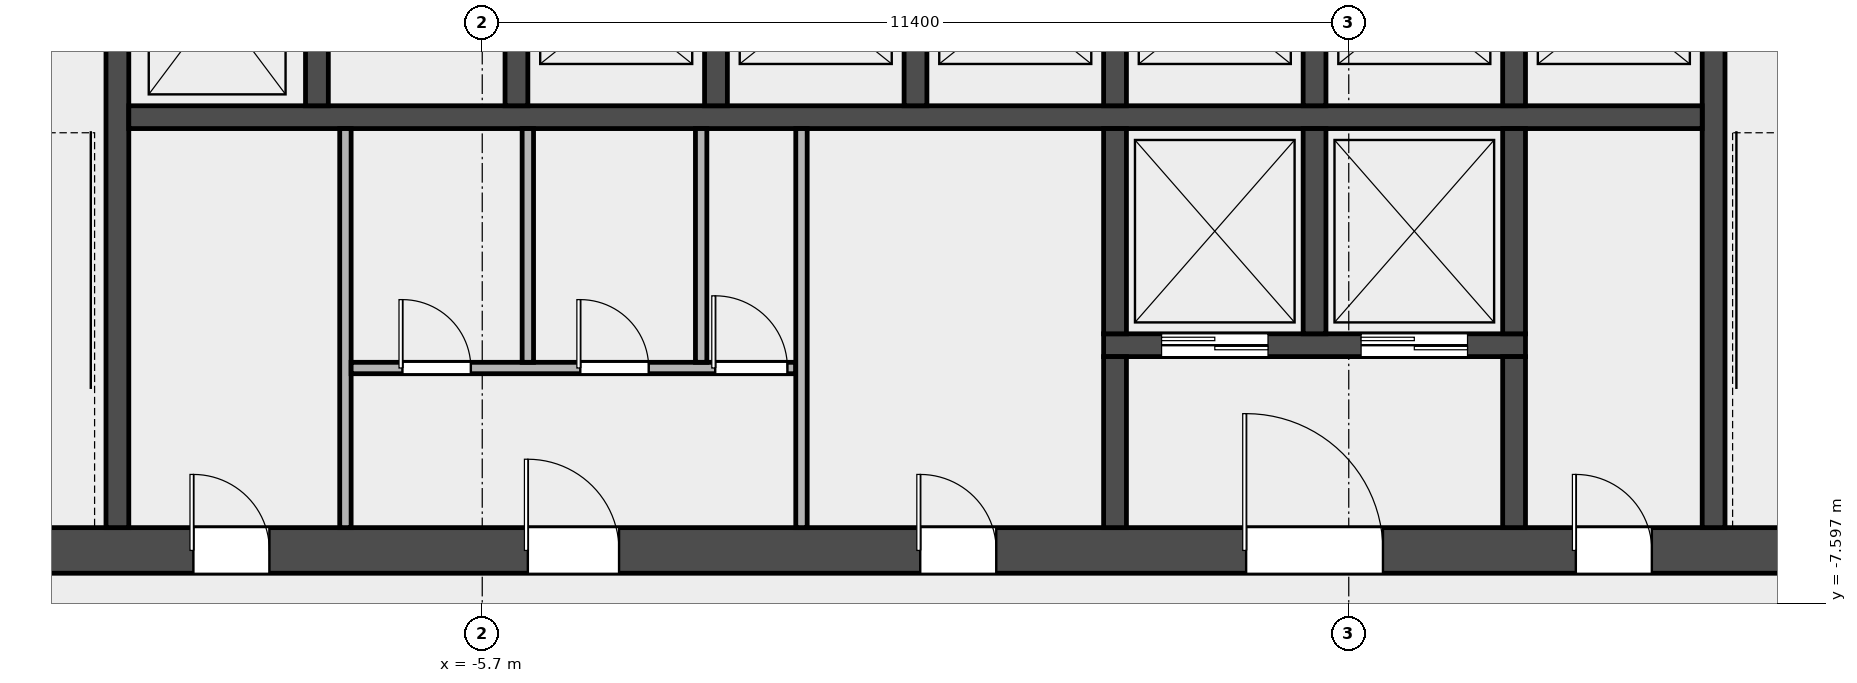
"""IFC4 building model, lengths in metres.
Left out: names, types, materials, properties, quantities, classifications, styles, units other than length and angle.
Written with IfcOpenShell. Run it as: python <this file> out.ifc"""

import sys

from ifc_helpers import new_model, si_unit, direction, frame, frame_2d, origin, place, context, subcontext, project, spatial, rectangle, extrude, element, fill, save


model = new_model("IFC4")
c1 = context("Model", 3, precision=1e-05, world=origin(), true_north=direction((0.0, 1.0)))
c2 = subcontext(c1, "Body", "Model", "MODEL_VIEW")
j1 = project(units=[si_unit("LENGTHUNIT", "METRE"), si_unit("PLANEANGLEUNIT", "RADIAN")], contexts=[c1])
p1 = place(None, origin())
s1 = spatial("IfcSite", under=j1, at=p1, CompositionType="ELEMENT")
p2 = place(p1, origin())
s2 = spatial("IfcBuilding", under=s1, at=p2, CompositionType="ELEMENT")
p3 = place(p2, frame((0.0, 0.0, 139.6)))
s3 = spatial("IfcBuildingStorey", under=s2, at=p3, CompositionType="ELEMENT", Elevation=139.6)
p4 = place(p3, frame((-14.4, -6.9, 0.0), z_axis=(0.0, 0.0, 1.0), x_axis=(1.0, 0.0, 0.0)))
e1 = element("IfcWall", 1, at=p4, inside=s3, PredefinedType="SHEAR", context=c2, shape_type="SweptSolid", body=[
    extrude(rectangle(XDim=28.8, YDim=0.6, at=frame_2d((14.4, 0.0))), origin(), (0.0, 0.0, 1.0), 4.2),
])
p5 = place(p4, frame((4.9, 0.0, 0.0)))
e2 = element("IfcOpeningElement", 2, at=p5, cuts=e1, PredefinedType="OPENING", context=c2, shape_type="SweptSolid", body=[
    extrude(rectangle(XDim=1.0, YDim=2.1, at=frame_2d((0.5, 1.05))), frame((0.0, 0.312, 0.0), z_axis=(0.0, -1.0, 0.0), x_axis=(1.0, 0.0, 0.0)), (0.0, 0.0, 1.0), 0.624),
])
p6 = place(p4, frame((9.3, 0.0, 0.0)))
e3 = element("IfcOpeningElement", 3, at=p6, cuts=e1, PredefinedType="OPENING", context=c2, shape_type="SweptSolid", body=[
    extrude(rectangle(XDim=1.2, YDim=2.1, at=frame_2d((0.6, 1.05))), frame((0.0, 0.312, 0.0), z_axis=(0.0, -1.0, 0.0), x_axis=(1.0, 0.0, 0.0)), (0.0, 0.0, 1.0), 0.624),
])
p7 = place(p4, frame((14.462, 0.0, 0.0)))
e4 = element("IfcOpeningElement", 4, at=p7, cuts=e1, PredefinedType="OPENING", context=c2, shape_type="SweptSolid", body=[
    extrude(rectangle(XDim=1.0, YDim=2.1, at=frame_2d((0.5, 1.05))), frame((0.0, 0.312, 0.0), z_axis=(0.0, -1.0, 0.0), x_axis=(1.0, 0.0, 0.0)), (0.0, 0.0, 1.0), 0.624),
])
p8 = place(p4, frame((18.75, 0.0, 0.0)))
e5 = element("IfcOpeningElement", 5, at=p8, cuts=e1, PredefinedType="OPENING", context=c2, shape_type="SweptSolid", body=[
    extrude(rectangle(XDim=1.8, YDim=2.1, at=frame_2d((0.9, 1.05))), frame((0.0, 0.312, 0.0), z_axis=(0.0, -1.0, 0.0), x_axis=(1.0, 0.0, 0.0)), (0.0, 0.0, 1.0), 0.624),
])
p9 = place(p4, frame((23.087, 0.0, 0.0)))
e6 = element("IfcOpeningElement", 6, at=p9, cuts=e1, PredefinedType="OPENING", context=c2, shape_type="SweptSolid", body=[
    extrude(rectangle(XDim=1.0, YDim=2.1, at=frame_2d((0.5, 1.05))), frame((0.0, 0.312, 0.0), z_axis=(0.0, -1.0, 0.0), x_axis=(1.0, 0.0, 0.0)), (0.0, 0.0, 1.0), 0.624),
])
for number, where, z_axis, x_axis in (
    (7, (-10.5, -6.6, 0.0), (0.0, 0.0, 1.0), (0.0, 1.0, 0.0)),
    (8, (10.5, -6.6, 0.0), (0.0, 0.0, 1.0), (0.0, 1.0, 0.0)),
):
    element("IfcWall", number, at=place(p3, frame(where, z_axis=z_axis, x_axis=x_axis)), inside=s3, PredefinedType="SHEAR", context=c2, shape_type="SweptSolid", body=[
        extrude(rectangle(XDim=8.55, YDim=0.3, at=frame_2d((4.275, 0.0))), origin(), (0.0, 0.0, 1.0), 4.2),
    ])
p10 = place(p3, frame((-10.35, -1.2, 0.0), z_axis=(0.0, 0.0, 1.0), x_axis=(1.0, 0.0, 0.0)))
e9 = element("IfcWall", 9, at=p10, inside=s3, PredefinedType="SOLIDWALL", context=c2, shape_type="SweptSolid", body=[
    extrude(rectangle(XDim=20.7, YDim=0.3, at=frame_2d((10.35, 0.0))), origin(), (0.0, 0.0, 1.0), 4.2),
])
for number, where, z_axis, x_axis in (
    (10, (-7.875, -1.05, 0.0), (0.0, 0.0, 1.0), (0.0, 1.0, 0.0)),
    (11, (-5.25, -1.05, 0.0), (0.0, 0.0, 1.0), (0.0, 1.0, 0.0)),
    (12, (-2.625, -1.05, 0.0), (0.0, 0.0, 1.0), (0.0, 1.0, 0.0)),
    (13, (0.0, -1.05, 0.0), (0.0, 0.0, 1.0), (0.0, 1.0, 0.0)),
    (14, (2.625, -1.05, 0.0), (0.0, 0.0, 1.0), (0.0, 1.0, 0.0)),
    (15, (5.25, -1.05, 0.0), (0.0, 0.0, 1.0), (0.0, 1.0, 0.0)),
    (16, (7.875, -1.05, 0.0), (0.0, 0.0, 1.0), (0.0, 1.0, 0.0)),
):
    element("IfcWall", number, at=place(p3, frame(where, z_axis=z_axis, x_axis=x_axis)), inside=s3, PredefinedType="SOLIDWALL", context=c2, shape_type="SweptSolid", body=[
        extrude(rectangle(XDim=2.7, YDim=0.3, at=frame_2d((1.35, 0.0))), origin(), (0.0, 0.0, 1.0), 4.2),
    ])
p11 = place(p3, frame((2.475, -4.2, 0.0), z_axis=(0.0, 0.0, 1.0), x_axis=(1.0, 0.0, 0.0)))
e17 = element("IfcWall", 17, at=p11, inside=s3, PredefinedType="SOLIDWALL", context=c2, shape_type="SweptSolid", body=[
    extrude(rectangle(XDim=5.55, YDim=0.3, at=frame_2d((2.775, 0.0))), origin(), (0.0, 0.0, 1.0), 4.2),
])
p12 = place(p11, frame((0.762, 0.0, 0.0)))
e18 = element("IfcOpeningElement", 18, at=p12, cuts=e17, PredefinedType="OPENING", context=c2, shape_type="SweptSolid", body=[
    extrude(rectangle(XDim=1.4, YDim=2.1, at=frame_2d((0.7, 1.05))), frame((0.0, 0.162, 0.0), z_axis=(0.0, -1.0, 0.0), x_axis=(1.0, 0.0, 0.0)), (0.0, 0.0, 1.0), 0.324),
])
p13 = place(p11, frame((3.387, 0.0, 0.0)))
e19 = element("IfcOpeningElement", 19, at=p13, cuts=e17, PredefinedType="OPENING", context=c2, shape_type="SweptSolid", body=[
    extrude(rectangle(XDim=1.4, YDim=2.1, at=frame_2d((0.7, 1.05))), frame((0.0, 0.162, 0.0), z_axis=(0.0, -1.0, 0.0), x_axis=(1.0, 0.0, 0.0)), (0.0, 0.0, 1.0), 0.324),
])
p14 = place(p3, frame((2.625, -4.05, 0.0), z_axis=(0.0, 0.0, 1.0), x_axis=(0.0, 1.0, 0.0)))
e20 = element("IfcWall", 20, at=p14, inside=s3, PredefinedType="SOLIDWALL", context=c2, shape_type="SweptSolid", body=[
    extrude(rectangle(XDim=2.7, YDim=0.3, at=frame_2d((1.35, 0.0))), origin(), (0.0, 0.0, 1.0), 4.2),
])
p15 = place(p3, frame((2.625, -6.6, 0.0), z_axis=(0.0, 0.0, 1.0), x_axis=(0.0, 1.0, 0.0)))
e21 = element("IfcWall", 21, at=p15, inside=s3, PredefinedType="SOLIDWALL", context=c2, shape_type="SweptSolid", body=[
    extrude(rectangle(XDim=2.25, YDim=0.3, at=frame_2d((1.125, 0.0))), origin(), (0.0, 0.0, 1.0), 4.2),
])
for number, where, z_axis, x_axis in (
    (22, (5.25, -4.05, 0.0), (0.0, 0.0, 1.0), (0.0, 1.0, 0.0)),
    (23, (7.875, -4.05, 0.0), (0.0, 0.0, 1.0), (0.0, 1.0, 0.0)),
):
    element("IfcWall", number, at=place(p3, frame(where, z_axis=z_axis, x_axis=x_axis)), inside=s3, PredefinedType="SOLIDWALL", context=c2, shape_type="SweptSolid", body=[
        extrude(rectangle(XDim=2.7, YDim=0.3, at=frame_2d((1.35, 0.0))), origin(), (0.0, 0.0, 1.0), 4.2),
    ])
p16 = place(p3, frame((7.875, -6.6, 0.0), z_axis=(0.0, 0.0, 1.0), x_axis=(0.0, 1.0, 0.0)))
e24 = element("IfcWall", 24, at=p16, inside=s3, PredefinedType="SOLIDWALL", context=c2, shape_type="SweptSolid", body=[
    extrude(rectangle(XDim=2.25, YDim=0.3, at=frame_2d((1.125, 0.0))), origin(), (0.0, 0.0, 1.0), 4.2),
])
p17 = place(p3, frame((-7.5, -6.6, 0.0), z_axis=(0.0, 0.0, 1.0), x_axis=(0.0, 1.0, 0.0)))
e25 = element("IfcWall", 25, at=p17, inside=s3, PredefinedType="PARTITIONING", context=c2, shape_type="SweptSolid", body=[
    extrude(rectangle(XDim=5.25, YDim=0.15, at=frame_2d((2.625, 0.0))), origin(), (0.0, 0.0, 1.0), 4.2),
])
p18 = place(p3, frame((-7.425, -4.5, 0.0), z_axis=(0.0, 0.0, 1.0), x_axis=(1.0, 0.0, 0.0)))
e26 = element("IfcWall", 26, at=p18, inside=s3, PredefinedType="PARTITIONING", context=c2, shape_type="SweptSolid", body=[
    extrude(rectangle(XDim=5.85, YDim=0.15, at=frame_2d((2.925, 0.0))), origin(), (0.0, 0.0, 1.0), 4.2),
])
p19 = place(p18, frame((0.675, 0.0, 0.0)))
e27 = element("IfcOpeningElement", 27, at=p19, cuts=e26, PredefinedType="OPENING", context=c2, shape_type="SweptSolid", body=[
    extrude(rectangle(XDim=0.9, YDim=2.1, at=frame_2d((0.45, 1.05))), frame((0.0, 0.087, 0.0), z_axis=(0.0, -1.0, 0.0), x_axis=(1.0, 0.0, 0.0)), (0.0, 0.0, 1.0), 0.174),
])
p20 = place(p18, frame((3.015, 0.0, 0.0)))
e28 = element("IfcOpeningElement", 28, at=p20, cuts=e26, PredefinedType="OPENING", context=c2, shape_type="SweptSolid", body=[
    extrude(rectangle(XDim=0.9, YDim=2.1, at=frame_2d((0.45, 1.05))), frame((0.0, 0.087, 0.0), z_axis=(0.0, -1.0, 0.0), x_axis=(1.0, 0.0, 0.0)), (0.0, 0.0, 1.0), 0.174),
])
p21 = place(p18, frame((4.79, 0.0, 0.0)))
e29 = element("IfcOpeningElement", 29, at=p21, cuts=e26, PredefinedType="OPENING", context=c2, shape_type="SweptSolid", body=[
    extrude(rectangle(XDim=0.95, YDim=2.1, at=frame_2d((0.475, 1.05))), frame((0.0, 0.087, 0.0), z_axis=(0.0, -1.0, 0.0), x_axis=(1.0, 0.0, 0.0)), (0.0, 0.0, 1.0), 0.174),
])
for number, where, z_axis, x_axis in (
    (30, (-5.1, -4.425, 0.0), (0.0, 0.0, 1.0), (0.0, 1.0, 0.0)),
    (31, (-2.82, -4.425, 0.0), (0.0, 0.0, 1.0), (0.0, 1.0, 0.0)),
):
    element("IfcWall", number, at=place(p3, frame(where, z_axis=z_axis, x_axis=x_axis)), inside=s3, PredefinedType="PARTITIONING", context=c2, shape_type="SweptSolid", body=[
        extrude(rectangle(XDim=3.075, YDim=0.15, at=frame_2d((1.538, 0.0))), origin(), (0.0, 0.0, 1.0), 4.2),
    ])
p22 = place(p3, frame((-1.5, -6.6, 0.0), z_axis=(0.0, 0.0, 1.0), x_axis=(0.0, 1.0, 0.0)))
e32 = element("IfcWall", 32, at=p22, inside=s3, PredefinedType="PARTITIONING", context=c2, shape_type="SweptSolid", body=[
    extrude(rectangle(XDim=5.25, YDim=0.15, at=frame_2d((2.625, 0.0))), origin(), (0.0, 0.0, 1.0), 4.2),
])
p23 = place(p12, origin())
e33 = element("IfcDoor", 33, at=p23, inside=s3, OperationType="DOUBLE_DOOR_SLIDING", PredefinedType="DOOR", context=c2, shape_type="SweptSolid", body=[
    extrude(rectangle(XDim=1.4, YDim=2.1, at=frame_2d((0.7, 1.05))), frame((0.0, 0.025, 0.0), z_axis=(0.0, -1.0, 0.0), x_axis=(1.0, 0.0, 0.0)), (0.0, 0.0, 1.0), 0.05),
])
fill(e18, e33)
p24 = place(p13, origin())
e34 = element("IfcDoor", 34, at=p24, inside=s3, OperationType="DOUBLE_DOOR_SLIDING", PredefinedType="DOOR", context=c2, shape_type="SweptSolid", body=[
    extrude(rectangle(XDim=1.4, YDim=2.1, at=frame_2d((0.7, 1.05))), frame((0.0, 0.025, 0.0), z_axis=(0.0, -1.0, 0.0), x_axis=(1.0, 0.0, 0.0)), (0.0, 0.0, 1.0), 0.05),
])
fill(e19, e34)
p25 = place(p5, origin())
e35 = element("IfcDoor", 35, at=p25, inside=s3, OperationType="SINGLE_SWING_LEFT", PredefinedType="DOOR", context=c2, shape_type="SweptSolid", body=[
    extrude(rectangle(XDim=1.0, YDim=2.1, at=frame_2d((0.5, 1.05))), frame((0.0, 0.025, 0.0), z_axis=(0.0, -1.0, 0.0), x_axis=(1.0, 0.0, 0.0)), (0.0, 0.0, 1.0), 0.05),
])
fill(e2, e35)
p26 = place(p6, origin())
e36 = element("IfcDoor", 36, at=p26, inside=s3, OperationType="SINGLE_SWING_LEFT", PredefinedType="DOOR", context=c2, shape_type="SweptSolid", body=[
    extrude(rectangle(XDim=1.2, YDim=2.1, at=frame_2d((0.6, 1.05))), frame((0.0, 0.025, 0.0), z_axis=(0.0, -1.0, 0.0), x_axis=(1.0, 0.0, 0.0)), (0.0, 0.0, 1.0), 0.05),
])
fill(e3, e36)
p27 = place(p19, origin())
e37 = element("IfcDoor", 37, at=p27, inside=s3, OperationType="SINGLE_SWING_LEFT", PredefinedType="DOOR", context=c2, shape_type="SweptSolid", body=[
    extrude(rectangle(XDim=0.9, YDim=2.1, at=frame_2d((0.45, 1.05))), frame((0.0, 0.025, 0.0), z_axis=(0.0, -1.0, 0.0), x_axis=(1.0, 0.0, 0.0)), (0.0, 0.0, 1.0), 0.05),
])
fill(e27, e37)
p28 = place(p20, origin())
e38 = element("IfcDoor", 38, at=p28, inside=s3, OperationType="SINGLE_SWING_LEFT", PredefinedType="DOOR", context=c2, shape_type="SweptSolid", body=[
    extrude(rectangle(XDim=0.9, YDim=2.1, at=frame_2d((0.45, 1.05))), frame((0.0, 0.025, 0.0), z_axis=(0.0, -1.0, 0.0), x_axis=(1.0, 0.0, 0.0)), (0.0, 0.0, 1.0), 0.05),
])
fill(e28, e38)
p29 = place(p21, origin())
e39 = element("IfcDoor", 39, at=p29, inside=s3, OperationType="SINGLE_SWING_LEFT", PredefinedType="DOOR", context=c2, shape_type="SweptSolid", body=[
    extrude(rectangle(XDim=0.95, YDim=2.1, at=frame_2d((0.475, 1.05))), frame((0.0, 0.025, 0.0), z_axis=(0.0, -1.0, 0.0), x_axis=(1.0, 0.0, 0.0)), (0.0, 0.0, 1.0), 0.05),
])
fill(e29, e39)
p30 = place(p7, origin())
e40 = element("IfcDoor", 40, at=p30, inside=s3, OperationType="SINGLE_SWING_LEFT", PredefinedType="DOOR", context=c2, shape_type="SweptSolid", body=[
    extrude(rectangle(XDim=1.0, YDim=2.1, at=frame_2d((0.5, 1.05))), frame((0.0, 0.025, 0.0), z_axis=(0.0, -1.0, 0.0), x_axis=(1.0, 0.0, 0.0)), (0.0, 0.0, 1.0), 0.05),
])
fill(e4, e40)
p31 = place(p8, origin())
e41 = element("IfcDoor", 41, at=p31, inside=s3, OperationType="DOUBLE_DOOR_SINGLE_SWING", PredefinedType="DOOR", context=c2, shape_type="SweptSolid", body=[
    extrude(rectangle(XDim=1.8, YDim=2.1, at=frame_2d((0.9, 1.05))), frame((0.0, 0.025, 0.0), z_axis=(0.0, -1.0, 0.0), x_axis=(1.0, 0.0, 0.0)), (0.0, 0.0, 1.0), 0.05),
])
fill(e5, e41)
p32 = place(p9, origin())
e42 = element("IfcDoor", 42, at=p32, inside=s3, OperationType="SINGLE_SWING_LEFT", PredefinedType="DOOR", context=c2, shape_type="SweptSolid", body=[
    extrude(rectangle(XDim=1.0, YDim=2.1, at=frame_2d((0.5, 1.05))), frame((0.0, 0.025, 0.0), z_axis=(0.0, -1.0, 0.0), x_axis=(1.0, 0.0, 0.0)), (0.0, 0.0, 1.0), 0.05),
])
fill(e6, e42)
save(model, sys.argv[1])
